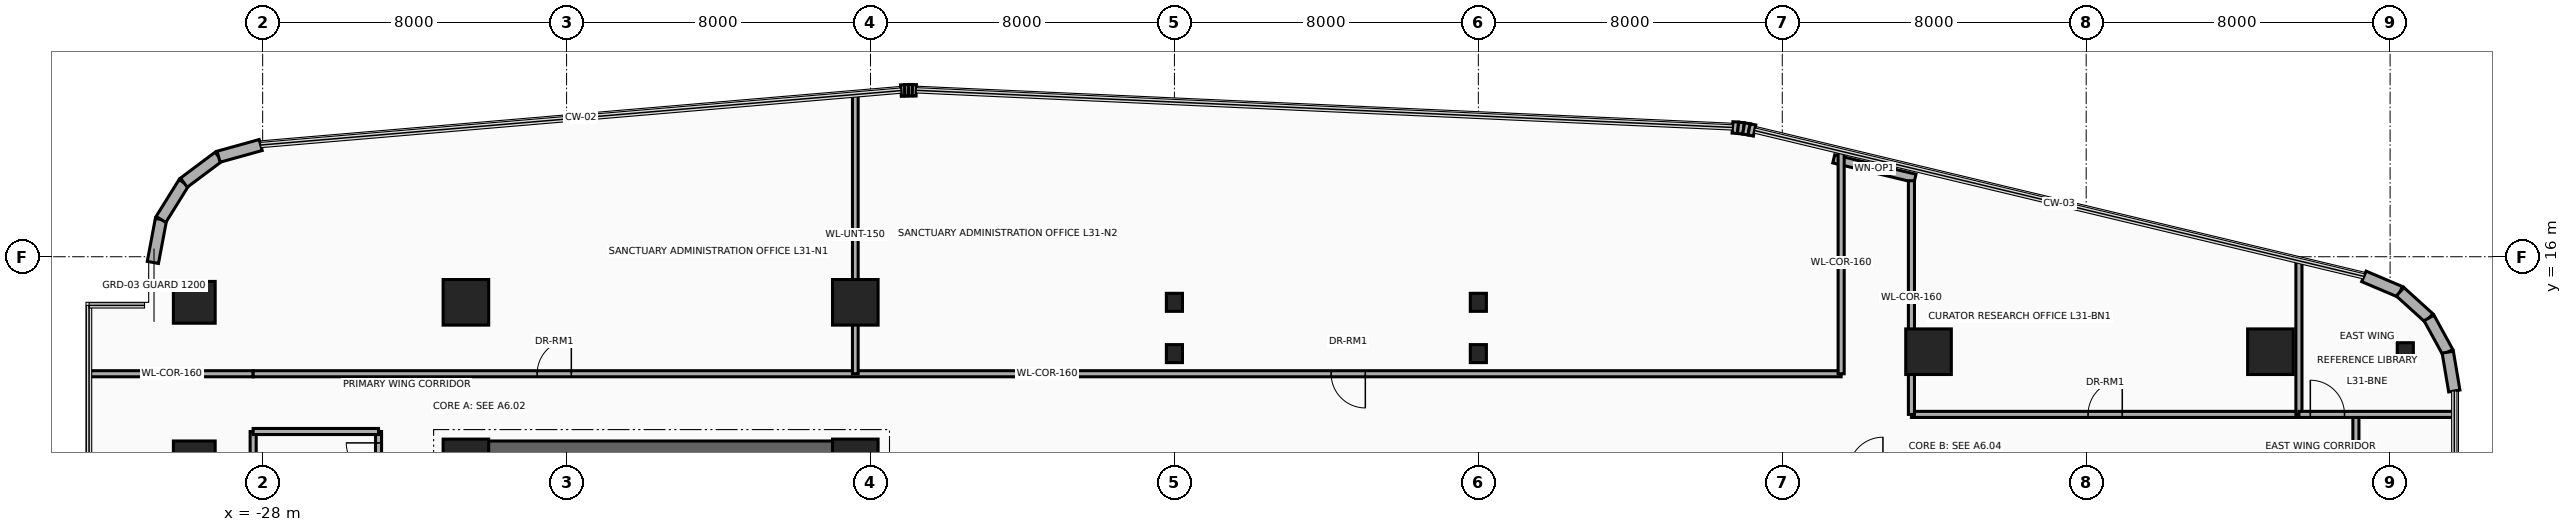
"""IFC4 building model, lengths in metres.
Left out: names, types, materials, properties, quantities, classifications, styles, units other than length and angle.
Written with IfcOpenShell. Run it as: python <this file> out.ifc"""

import sys

from ifc_helpers import new_model, si_unit, direction, frame, frame_2d, origin, origin_2d, place, context, subcontext, project, spatial, rectangle, circle, i_section, extrude, source, transform, mapped, element, fill, save


model = new_model("IFC4")
c1 = context("Model", 3, precision=1e-05, world=origin(), true_north=direction((0.0, 1.0)))
c2 = subcontext(c1, "Body", "Model", "MODEL_VIEW")
j1 = project(units=[si_unit("LENGTHUNIT", "METRE"), si_unit("PLANEANGLEUNIT", "RADIAN")], contexts=[c1])
p1 = place(None, origin())
s1 = spatial("IfcSite", under=j1, at=p1, CompositionType="ELEMENT")
p2 = place(p1, origin())
s2 = spatial("IfcBuilding", under=s1, at=p2, CompositionType="ELEMENT")
p3 = place(p2, frame((0.0, 0.0, 124.2)))
s3 = spatial("IfcBuildingStorey", under=s2, at=p3, CompositionType="ELEMENT", Elevation=124.2)
p4 = place(p3, frame((-22.65, -11.15, 0.0), z_axis=(0.0, 0.0, 1.0), x_axis=(0.0, 1.0, 0.0)))
e1 = element("IfcWall", 1, at=p4, inside=s3, PredefinedType="SHEAR", context=c2, shape_type="SweptSolid", body=[
    extrude(rectangle(XDim=22.3, YDim=0.7, at=frame_2d((11.15, 0.0))), origin(), (0.0, 0.0, 1.0), 3.46),
])
p5 = place(p3, frame((-22.65, 10.8, 0.0), z_axis=(0.0, 0.0, 1.0), x_axis=(1.0, 0.0, 0.0)))
e2 = element("IfcWall", 2, at=p5, inside=s3, PredefinedType="SHEAR", context=c2, shape_type="SweptSolid", body=[
    extrude(rectangle(XDim=10.25, YDim=0.7, at=frame_2d((5.125, 0.0))), origin(), (0.0, 0.0, 1.0), 3.46),
])
m1 = source(origin(), c2, "Body", "SweptSolid", [
    extrude(circle(Radius=0.55, at=origin_2d()), origin(), (0.0, 0.0, 1.0), 3.7),
])
p6 = place(p3, frame((-29.8, 10.6, 0.0), z_axis=(0.0, 0.0, 1.0), x_axis=(1.0, 0.0, 0.0)))
e3 = element("IfcColumn", 3, at=p6, inside=s3, PredefinedType="COLUMN", context=c2, shape_type="MappedRepresentation", body=[
    mapped(m1, transform((0.0, 0.0, 0.0), x_axis=(1.0, 0.0, 0.0), y_axis=(0.0, 1.0, 0.0), z_axis=(0.0, 0.0, 1.0), scale=1.0)),
])
m2 = source(origin(), c2, "Body", "SweptSolid", [
    extrude(rectangle(XDim=1.2, YDim=1.2, at=origin_2d()), origin(), (0.0, 0.0, 1.0), 3.7),
])
for number, where, z_axis, x_axis in (
    (4, (-22.65, 10.6, 0.0), (0.0, 0.0, 1.0), (1.0, 0.0, 0.0)),
    (5, (-12.4, 10.6, 0.0), (0.0, 0.0, 1.0), (1.0, 0.0, 0.0)),
):
    element("IfcColumn", number, at=place(p3, frame(where, z_axis=z_axis, x_axis=x_axis)), inside=s3, PredefinedType="COLUMN", context=c2, shape_type="MappedRepresentation", body=[
        mapped(m2, transform((0.0, 0.0, 0.0), x_axis=(1.0, 0.0, 0.0), y_axis=(0.0, 1.0, 0.0), z_axis=(0.0, 0.0, 1.0), scale=1.0)),
    ])
p7 = place(p3, frame((-29.8, 14.8, 0.0), z_axis=(0.0, 0.0, 1.0), x_axis=(1.0, 0.0, 0.0)))
e6 = element("IfcColumn", 6, at=p7, inside=s3, PredefinedType="COLUMN", context=c2, shape_type="MappedRepresentation", body=[
    mapped(m1, transform((0.0, 0.0, 0.0), x_axis=(1.0, 0.0, 0.0), y_axis=(0.0, 1.0, 0.0), z_axis=(0.0, 0.0, 1.0), scale=1.0)),
])
for number, where, z_axis, x_axis in (
    (7, (-22.65, 14.8, 0.0), (0.0, 0.0, 1.0), (1.0, 0.0, 0.0)),
    (8, (-12.4, 14.8, 0.0), (0.0, 0.0, 1.0), (1.0, 0.0, 0.0)),
    (9, (15.85, 13.5, 0.0), (0.0, 0.0, 1.0), (1.0, 0.0, 0.0)),
    (10, (24.85, 13.5, 0.0), (0.0, 0.0, 1.0), (1.0, 0.0, 0.0)),
):
    element("IfcColumn", number, at=place(p3, frame(where, z_axis=z_axis, x_axis=x_axis)), inside=s3, PredefinedType="COLUMN", context=c2, shape_type="MappedRepresentation", body=[
        mapped(m2, transform((0.0, 0.0, 0.0), x_axis=(1.0, 0.0, 0.0), y_axis=(0.0, 1.0, 0.0), z_axis=(0.0, 0.0, 1.0), scale=1.0)),
    ])
m3 = source(origin(), c2, "Body", "SweptSolid", [
    extrude(i_section(OverallWidth=0.424, OverallDepth=0.474, WebThickness=0.048, FlangeThickness=0.077, at=origin_2d()), origin(), (0.0, 0.0, 1.0), 3.7),
])
for number, where, z_axis, x_axis in (
    (11, (28.4, 13.5, 0.0), (0.0, 0.0, 1.0), (1.0, 0.0, 0.0)),
    (12, (-4.0, 13.45, 0.0), (0.0, 0.0, 1.0), (1.0, 0.0, 0.0)),
    (13, (-4.0, 14.8, 0.0), (0.0, 0.0, 1.0), (1.0, 0.0, 0.0)),
    (14, (4.0, 13.45, 0.0), (0.0, 0.0, 1.0), (1.0, 0.0, 0.0)),
    (15, (4.0, 14.8, 0.0), (0.0, 0.0, 1.0), (1.0, 0.0, 0.0)),
):
    element("IfcColumn", number, at=place(p3, frame(where, z_axis=z_axis, x_axis=x_axis)), inside=s3, PredefinedType="COLUMN", context=c2, shape_type="MappedRepresentation", body=[
        mapped(m3, transform((0.0, 0.0, 0.0), x_axis=(1.0, 0.0, 0.0), y_axis=(0.0, 1.0, 0.0), z_axis=(0.0, 0.0, 1.0), scale=1.0)),
    ])
p8 = place(p3, frame((-30.89, 15.85, 0.0), z_axis=(0.0, 0.0, 1.0), x_axis=(0.184557499391, 0.982821718023, 0.0)))
e16 = element("IfcWall", 16, at=p8, inside=s3, PredefinedType="SOLIDWALL", context=c2, shape_type="SweptSolid", body=[
    extrude(rectangle(XDim=1.151, YDim=0.3, at=frame_2d((0.575, 0.0))), origin(), (0.0, 0.0, 1.0), 3.46),
])
p9 = place(p3, frame((-30.677, 16.981, 0.0), z_axis=(0.0, 0.0, 1.0), x_axis=(0.52880576008, 0.848742875143, 0.0)))
e17 = element("IfcWall", 17, at=p9, inside=s3, PredefinedType="SOLIDWALL", context=c2, shape_type="SweptSolid", body=[
    extrude(rectangle(XDim=1.141, YDim=0.3, at=frame_2d((0.57, 0.0))), origin(), (0.0, 0.0, 1.0), 3.46),
])
p10 = place(p3, frame((-30.074, 17.95, 0.0), z_axis=(0.0, 0.0, 1.0), x_axis=(0.800975009324, 0.598697782223, 0.0)))
e18 = element("IfcWall", 18, at=p10, inside=s3, PredefinedType="SOLIDWALL", context=c2, shape_type="SweptSolid", body=[
    extrude(rectangle(XDim=1.141, YDim=0.3, at=frame_2d((0.57, 0.0))), origin(), (0.0, 0.0, 1.0), 3.46),
])
p11 = place(p3, frame((-29.161, 18.633, 0.0), z_axis=(0.0, 0.0, 1.0), x_axis=(0.963624193367, 0.267260947313, 0.0)))
e19 = element("IfcWall", 19, at=p11, inside=s3, PredefinedType="SOLIDWALL", context=c2, shape_type="SweptSolid", body=[
    extrude(rectangle(XDim=1.151, YDim=0.3, at=frame_2d((0.575, 0.0))), origin(), (0.0, 0.0, 1.0), 3.46),
])
p12 = place(p3, frame((-11.199, 20.373, 0.0), z_axis=(0.0, 0.0, 1.0), x_axis=(0.997567332166, 0.069709524416, 0.0)))
e20 = element("IfcWall", 20, at=p12, inside=s3, PredefinedType="SOLIDWALL", context=c2, shape_type="SweptSolid", body=[
    extrude(rectangle(XDim=0.102, YDim=0.3, at=frame_2d((0.051, 0.0))), origin(), (0.0, 0.0, 1.0), 3.46),
])
p13 = place(p3, frame((-11.098, 20.38, 0.0), z_axis=(0.0, 0.0, 1.0), x_axis=(0.999334672785, 0.03647206835, 0.0)))
e21 = element("IfcWall", 21, at=p13, inside=s3, PredefinedType="SOLIDWALL", context=c2, shape_type="SweptSolid", body=[
    extrude(rectangle(XDim=0.1, YDim=0.3, at=frame_2d((0.05, 0.0))), origin(), (0.0, 0.0, 1.0), 3.46),
])
p14 = place(p3, frame((-10.998, 20.383, 0.0), z_axis=(0.0, 0.0, 1.0), x_axis=(0.999997054401, 0.002427177317, 0.0)))
e22 = element("IfcWall", 22, at=p14, inside=s3, PredefinedType="SOLIDWALL", context=c2, shape_type="SweptSolid", body=[
    extrude(rectangle(XDim=0.101, YDim=0.3, at=frame_2d((0.05, 0.0))), origin(), (0.0, 0.0, 1.0), 3.46),
])
p15 = place(p3, frame((-10.897, 20.384, 0.0), z_axis=(0.0, 0.0, 1.0), x_axis=(0.999584209171, -0.02883415988, 0.0)))
e23 = element("IfcWall", 23, at=p15, inside=s3, PredefinedType="SOLIDWALL", context=c2, shape_type="SweptSolid", body=[
    extrude(rectangle(XDim=0.102, YDim=0.3, at=frame_2d((0.051, 0.0))), origin(), (0.0, 0.0, 1.0), 3.46),
])
p16 = place(p3, frame((10.69, 19.404, 0.0), z_axis=(0.0, 0.0, 1.0), x_axis=(0.99758310784, -0.069483400546, 0.0)))
e24 = element("IfcWall", 24, at=p16, inside=s3, PredefinedType="SOLIDWALL", context=c2, shape_type="SweptSolid", body=[
    extrude(rectangle(XDim=0.147, YDim=0.3, at=frame_2d((0.074, 0.0))), origin(), (0.0, 0.0, 1.0), 3.46),
])
for number, where, z_axis, x_axis in (
    (25, (10.837, 19.394, 0.0), (0.0, 0.0, 1.0), (0.993, -0.117, 0.0)),
    (26, (10.983, 19.377, 0.0), (0.0, 0.0, 1.0), (0.987, -0.163, 0.0)),
):
    element("IfcWall", number, at=place(p3, frame(where, z_axis=z_axis, x_axis=x_axis)), inside=s3, PredefinedType="SOLIDWALL", context=c2, shape_type="SweptSolid", body=[
        extrude(rectangle(XDim=0.146, YDim=0.3, at=frame_2d((0.073, 0.0))), origin(), (0.0, 0.0, 1.0), 3.46),
    ])
p17 = place(p3, frame((11.127, 19.353, 0.0), z_axis=(0.0, 0.0, 1.0), x_axis=(0.978019841688, -0.208511844421, 0.0)))
e27 = element("IfcWall", 27, at=p17, inside=s3, PredefinedType="SOLIDWALL", context=c2, shape_type="SweptSolid", body=[
    extrude(rectangle(XDim=0.147, YDim=0.3, at=frame_2d((0.074, 0.0))), origin(), (0.0, 0.0, 1.0), 3.46),
])
p18 = place(p3, frame((13.355, 18.576, 0.0), z_axis=(0.0, 0.0, 1.0), x_axis=(0.97252211384, -0.232810519721, 0.0)))
e28 = element("IfcWall", 28, at=p18, inside=s3, PredefinedType="SOLIDWALL", context=c2, shape_type="SweptSolid", body=[
    extrude(rectangle(XDim=2.2, YDim=0.22, at=frame_2d((1.1, 0.0))), origin(), (0.0, 0.0, 1.0), 3.46),
])
p19 = place(p18, frame((0.65, 0.0, 0.95)))
e29 = element("IfcOpeningElement", 29, at=p19, cuts=e28, PredefinedType="OPENING", context=c2, shape_type="SweptSolid", body=[
    extrude(rectangle(XDim=0.9, YDim=1.3, at=frame_2d((0.45, 0.65))), frame((0.0, 0.125, 0.0), z_axis=(0.0, -1.0, 0.0), x_axis=(1.0, 0.0, 0.0)), (0.0, 0.0, 1.0), 0.25),
])
p20 = place(p3, frame((27.31, 15.483, 0.0), z_axis=(0.0, 0.0, 1.0), x_axis=(0.920250328759, -0.391330208927, 0.0)))
e30 = element("IfcWall", 30, at=p20, inside=s3, PredefinedType="SOLIDWALL", context=c2, shape_type="SweptSolid", body=[
    extrude(rectangle(XDim=1.036, YDim=0.3, at=frame_2d((0.518, 0.0))), origin(), (0.0, 0.0, 1.0), 3.46),
])
p21 = place(p3, frame((28.264, 15.077, 0.0), z_axis=(0.0, 0.0, 1.0), x_axis=(0.741208839713, -0.671274501178, 0.0)))
e31 = element("IfcWall", 31, at=p21, inside=s3, PredefinedType="SOLIDWALL", context=c2, shape_type="SweptSolid", body=[
    extrude(rectangle(XDim=1.026, YDim=0.3, at=frame_2d((0.513, 0.0))), origin(), (0.0, 0.0, 1.0), 3.46),
])
p22 = place(p3, frame((29.025, 14.388, 0.0), z_axis=(0.0, 0.0, 1.0), x_axis=(0.480284137298, -0.87711296163, 0.0)))
e32 = element("IfcWall", 32, at=p22, inside=s3, PredefinedType="SOLIDWALL", context=c2, shape_type="SweptSolid", body=[
    extrude(rectangle(XDim=1.027, YDim=0.3, at=frame_2d((0.513, 0.0))), origin(), (0.0, 0.0, 1.0), 3.46),
])
p23 = place(p3, frame((29.518, 13.488, 0.0), z_axis=(0.0, 0.0, 1.0), x_axis=(0.166156796952, -0.986099345313, 0.0)))
e33 = element("IfcWall", 33, at=p23, inside=s3, PredefinedType="SOLIDWALL", context=c2, shape_type="SweptSolid", body=[
    extrude(rectangle(XDim=1.036, YDim=0.3, at=frame_2d((0.518, 0.0))), origin(), (0.0, 0.0, 1.0), 3.46),
])
p24 = place(p3, frame((-28.25, 8.8, 0.0), z_axis=(0.0, 0.0, 1.0), x_axis=(0.0, 1.0, 0.0)))
e34 = element("IfcWall", 34, at=p24, inside=s3, PredefinedType="PARTITIONING", context=c2, shape_type="SweptSolid", body=[
    extrude(rectangle(XDim=2.6, YDim=0.16, at=frame_2d((1.3, 0.0))), origin(), (0.0, 0.0, 1.0), 2.666),
])
p25 = place(p3, frame((-24.95, 8.8, 0.0), z_axis=(0.0, 0.0, 1.0), x_axis=(0.0, 1.0, 0.0)))
e35 = element("IfcWall", 35, at=p25, inside=s3, PredefinedType="PARTITIONING", context=c2, shape_type="SweptSolid", body=[
    extrude(rectangle(XDim=2.6, YDim=0.16, at=frame_2d((1.3, 0.0))), origin(), (0.0, 0.0, 1.0), 2.666),
])
p26 = place(p25, frame((0.3, 0.0, 0.0)))
e36 = element("IfcOpeningElement", 36, at=p26, cuts=e35, PredefinedType="OPENING", context=c2, shape_type="SweptSolid", body=[
    extrude(rectangle(XDim=0.85, YDim=2.1, at=frame_2d((0.425, 1.05))), frame((0.0, 0.095, 0.0), z_axis=(0.0, -1.0, 0.0), x_axis=(1.0, 0.0, 0.0)), (0.0, 0.0, 1.0), 0.19),
])
p27 = place(p25, frame((1.45, 0.0, 0.0)))
e37 = element("IfcOpeningElement", 37, at=p27, cuts=e35, PredefinedType="OPENING", context=c2, shape_type="SweptSolid", body=[
    extrude(rectangle(XDim=0.85, YDim=2.1, at=frame_2d((0.425, 1.05))), frame((0.0, 0.095, 0.0), z_axis=(0.0, -1.0, 0.0), x_axis=(1.0, 0.0, 0.0)), (0.0, 0.0, 1.0), 0.19),
])
p28 = place(p3, frame((-28.25, 11.4, 0.0), z_axis=(0.0, 0.0, 1.0), x_axis=(1.0, 0.0, 0.0)))
e38 = element("IfcWall", 38, at=p28, inside=s3, PredefinedType="PARTITIONING", context=c2, shape_type="SweptSolid", body=[
    extrude(rectangle(XDim=3.3, YDim=0.16, at=frame_2d((1.65, 0.0))), origin(), (0.0, 0.0, 1.0), 3.46),
])
p29 = place(p3, frame((-32.54, 12.92, 0.0), z_axis=(0.0, 0.0, 1.0), x_axis=(1.0, 0.0, 0.0)))
e39 = element("IfcWall", 39, at=p29, inside=s3, PredefinedType="PARTITIONING", context=c2, shape_type="SweptSolid", body=[
    extrude(rectangle(XDim=4.29, YDim=0.16, at=frame_2d((2.145, 0.0))), origin(), (0.0, 0.0, 1.0), 2.896),
])
p30 = place(p3, frame((-28.25, 12.92, 0.0), z_axis=(0.0, 0.0, 1.0), x_axis=(1.0, 0.0, 0.0)))
e40 = element("IfcWall", 40, at=p30, inside=s3, PredefinedType="PARTITIONING", context=c2, shape_type="SweptSolid", body=[
    extrude(rectangle(XDim=41.8, YDim=0.16, at=frame_2d((20.9, 0.0))), origin(), (0.0, 0.0, 1.0), 2.666),
])
p31 = place(p30, frame((7.475, 0.0, 0.0)))
e41 = element("IfcOpeningElement", 41, at=p31, cuts=e40, PredefinedType="OPENING", context=c2, shape_type="SweptSolid", body=[
    extrude(rectangle(XDim=0.9, YDim=2.1, at=frame_2d((0.45, 1.05))), frame((0.0, 0.095, 0.0), z_axis=(0.0, -1.0, 0.0), x_axis=(1.0, 0.0, 0.0)), (0.0, 0.0, 1.0), 0.19),
])
p32 = place(p30, frame((28.375, 0.0, 0.0)))
e42 = element("IfcOpeningElement", 42, at=p32, cuts=e40, PredefinedType="OPENING", context=c2, shape_type="SweptSolid", body=[
    extrude(rectangle(XDim=0.9, YDim=2.1, at=frame_2d((0.45, 1.05))), frame((0.0, 0.095, 0.0), z_axis=(0.0, -1.0, 0.0), x_axis=(1.0, 0.0, 0.0)), (0.0, 0.0, 1.0), 0.19),
])
p33 = place(p3, frame((13.55, 12.92, 0.0), z_axis=(0.0, 0.0, 1.0), x_axis=(0.0, 1.0, 0.0)))
e43 = element("IfcWall", 43, at=p33, inside=s3, PredefinedType="PARTITIONING", context=c2, shape_type="SweptSolid", body=[
    extrude(rectangle(XDim=5.857, YDim=0.16, at=frame_2d((2.928, 0.0))), origin(), (0.0, 0.0, 1.0), 2.666),
])
p34 = place(p3, frame((-12.4, 12.92, 0.0), z_axis=(0.0, 0.0, 1.0), x_axis=(0.0, 1.0, 0.0)))
e44 = element("IfcWall", 44, at=p34, inside=s3, PredefinedType="PARTITIONING", context=c2, shape_type="SweptSolid", body=[
    extrude(rectangle(XDim=7.351, YDim=0.15, at=frame_2d((3.675, 0.0))), origin(), (0.0, 0.0, 1.0), 2.666),
])
p35 = place(p3, frame((15.4, 11.85, 0.0), z_axis=(0.0, 0.0, 1.0), x_axis=(1.0, 0.0, 0.0)))
e45 = element("IfcWall", 45, at=p35, inside=s3, PredefinedType="PARTITIONING", context=c2, shape_type="SweptSolid", body=[
    extrude(rectangle(XDim=10.2, YDim=0.16, at=frame_2d((5.1, 0.0))), origin(), (0.0, 0.0, 1.0), 2.834),
])
p36 = place(p35, frame((4.65, 0.0, 0.0)))
e46 = element("IfcOpeningElement", 46, at=p36, cuts=e45, PredefinedType="OPENING", context=c2, shape_type="SweptSolid", body=[
    extrude(rectangle(XDim=0.9, YDim=2.1, at=frame_2d((0.45, 1.05))), frame((0.0, 0.095, 0.0), z_axis=(0.0, -1.0, 0.0), x_axis=(1.0, 0.0, 0.0)), (0.0, 0.0, 1.0), 0.19),
])
p37 = place(p3, frame((15.4, 11.85, 0.0), z_axis=(0.0, 0.0, 1.0), x_axis=(0.0, 1.0, 0.0)))
e47 = element("IfcWall", 47, at=p37, inside=s3, PredefinedType="PARTITIONING", context=c2, shape_type="SweptSolid", body=[
    extrude(rectangle(XDim=6.15, YDim=0.16, at=frame_2d((3.075, 0.0))), origin(), (0.0, 0.0, 1.0), 2.666),
])
p38 = place(p3, frame((25.6, 11.85, 0.0), z_axis=(0.0, 0.0, 1.0), x_axis=(0.0, 1.0, 0.0)))
e48 = element("IfcWall", 48, at=p38, inside=s3, PredefinedType="PARTITIONING", context=c2, shape_type="SweptSolid", body=[
    extrude(rectangle(XDim=4.042, YDim=0.16, at=frame_2d((2.021, 0.0))), origin(), (0.0, 0.0, 1.0), 2.666),
])
p39 = place(p3, frame((27.1, -11.661, 0.0), z_axis=(0.0, 0.0, 1.0), x_axis=(0.0, 1.0, 0.0)))
e49 = element("IfcWall", 49, at=p39, inside=s3, PredefinedType="PARTITIONING", context=c2, shape_type="SweptSolid", body=[
    extrude(rectangle(XDim=23.511, YDim=0.16, at=frame_2d((11.755, 0.0))), origin(), (0.0, 0.0, 1.0), 2.666),
])
p40 = place(p39, frame((11.305, 0.0, 0.0)))
e50 = element("IfcOpeningElement", 50, at=p40, cuts=e49, PredefinedType="OPENING", context=c2, shape_type="SweptSolid", body=[
    extrude(rectangle(XDim=0.9, YDim=2.1, at=frame_2d((0.45, 1.05))), frame((0.0, 0.095, 0.0), z_axis=(0.0, -1.0, 0.0), x_axis=(1.0, 0.0, 0.0)), (0.0, 0.0, 1.0), 0.19),
])
p41 = place(p3, frame((25.6, 11.85, 0.0), z_axis=(0.0, 0.0, 1.0), x_axis=(1.0, 0.0, 0.0)))
e51 = element("IfcWall", 51, at=p41, inside=s3, PredefinedType="PARTITIONING", context=c2, shape_type="SweptSolid", body=[
    extrude(rectangle(XDim=4.09, YDim=0.16, at=frame_2d((2.045, 0.0))), origin(), (0.0, 0.0, 1.0), 2.896),
])
p42 = place(p41, frame((0.3, 0.0, 0.0)))
e52 = element("IfcOpeningElement", 52, at=p42, cuts=e51, PredefinedType="OPENING", context=c2, shape_type="SweptSolid", body=[
    extrude(rectangle(XDim=0.9, YDim=2.1, at=frame_2d((0.45, 1.05))), frame((0.0, 0.095, 0.0), z_axis=(0.0, -1.0, 0.0), x_axis=(1.0, 0.0, 0.0)), (0.0, 0.0, 1.0), 0.19),
])
p43 = place(p19, origin())
e53 = element("IfcWindow", 53, at=p43, inside=s3, PartitioningType="SINGLE_PANEL", PredefinedType="WINDOW", context=c2, shape_type="SweptSolid", body=[
    extrude(rectangle(XDim=0.9, YDim=1.3, at=frame_2d((0.45, 0.65))), frame((0.0, 0.03, 0.0), z_axis=(0.0, -1.0, 0.0), x_axis=(1.0, 0.0, 0.0)), (0.0, 0.0, 1.0), 0.06),
])
fill(e29, e53)
p44 = place(p27, origin())
e54 = element("IfcDoor", 54, at=p44, inside=s3, OperationType="SINGLE_SWING_LEFT", PredefinedType="DOOR", context=c2, shape_type="SweptSolid", body=[
    extrude(rectangle(XDim=0.85, YDim=2.1, at=frame_2d((0.425, 1.05))), frame((0.0, 0.025, 0.0), z_axis=(0.0, -1.0, 0.0), x_axis=(1.0, 0.0, 0.0)), (0.0, 0.0, 1.0), 0.05),
])
fill(e37, e54)
p45 = place(p31, origin())
e55 = element("IfcDoor", 55, at=p45, inside=s3, OperationType="SINGLE_SWING_RIGHT", PredefinedType="DOOR", context=c2, shape_type="SweptSolid", body=[
    extrude(rectangle(XDim=0.9, YDim=2.1, at=frame_2d((0.45, 1.05))), frame((0.0, 0.025, 0.0), z_axis=(0.0, -1.0, 0.0), x_axis=(1.0, 0.0, 0.0)), (0.0, 0.0, 1.0), 0.05),
])
fill(e41, e55)
p46 = place(p32, frame((0.9, 0.0, 0.0), z_axis=(0.0, 0.0, 1.0), x_axis=(-1.0, 0.0, 0.0)))
e56 = element("IfcDoor", 56, at=p46, inside=s3, OperationType="SINGLE_SWING_LEFT", PredefinedType="DOOR", context=c2, shape_type="SweptSolid", body=[
    extrude(rectangle(XDim=0.9, YDim=2.1, at=frame_2d((0.45, 1.05))), frame((0.0, 0.025, 0.0), z_axis=(0.0, -1.0, 0.0), x_axis=(1.0, 0.0, 0.0)), (0.0, 0.0, 1.0), 0.05),
])
fill(e42, e56)
p47 = place(p36, origin())
e57 = element("IfcDoor", 57, at=p47, inside=s3, OperationType="SINGLE_SWING_RIGHT", PredefinedType="DOOR", context=c2, shape_type="SweptSolid", body=[
    extrude(rectangle(XDim=0.9, YDim=2.1, at=frame_2d((0.45, 1.05))), frame((0.0, 0.025, 0.0), z_axis=(0.0, -1.0, 0.0), x_axis=(1.0, 0.0, 0.0)), (0.0, 0.0, 1.0), 0.05),
])
fill(e46, e57)
p48 = place(p42, origin())
e58 = element("IfcDoor", 58, at=p48, inside=s3, OperationType="SINGLE_SWING_RIGHT", PredefinedType="DOOR", context=c2, shape_type="SweptSolid", body=[
    extrude(rectangle(XDim=0.9, YDim=2.1, at=frame_2d((0.45, 1.05))), frame((0.0, 0.025, 0.0), z_axis=(0.0, -1.0, 0.0), x_axis=(1.0, 0.0, 0.0)), (0.0, 0.0, 1.0), 0.05),
])
fill(e52, e58)
save(model, sys.argv[1])
